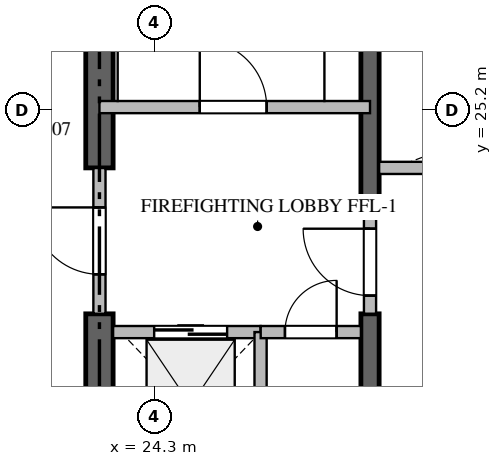
"""IFC4 building model, lengths in metres.
Left out: names, types, materials, properties, quantities, classifications, styles, units other than length and angle.
Written with IfcOpenShell. Run it as: python <this file> out.ifc"""

import sys

from ifc_helpers import new_model, si_unit, direction, frame, frame_2d, origin, place, context, subcontext, project, spatial, rectangle, extrude, source, transform, mapped, element, fill, save


model = new_model("IFC4")
c1 = context("Model", 3, precision=1e-05, world=origin(), true_north=direction((0.0, 1.0)))
c2 = subcontext(c1, "Body", "Model", "MODEL_VIEW")
j1 = project(units=[si_unit("LENGTHUNIT", "METRE"), si_unit("PLANEANGLEUNIT", "RADIAN")], contexts=[c1])
p1 = place(None, origin())
s1 = spatial("IfcSite", under=j1, at=p1, CompositionType="ELEMENT")
p2 = place(p1, origin())
s2 = spatial("IfcBuilding", under=s1, at=p2, CompositionType="ELEMENT")
p3 = place(p2, frame((0.0, 0.0, 26.7)))
s3 = spatial("IfcBuildingStorey", under=s2, at=p3, CompositionType="ELEMENT", Elevation=26.7)
p4 = place(p3, frame((23.4, 17.025, -0.44), z_axis=(0.0, 0.0, 1.0), x_axis=(0.0, 1.0, 0.0)))
e1 = element("IfcWall", 1, at=p4, inside=s3, PredefinedType="SHEAR", context=c2, shape_type="SweptSolid", body=[
    extrude(rectangle(XDim=4.825, YDim=0.45, at=frame_2d((2.413, 0.0))), origin(), (0.0, 0.0, 1.0), 3.928),
])
p5 = place(p3, frame((23.4, 24.25, -0.44), z_axis=(0.0, 0.0, 1.0), x_axis=(0.0, 1.0, 0.0)))
e2 = element("IfcWall", 2, at=p5, inside=s3, PredefinedType="SHEAR", context=c2, shape_type="SweptSolid", body=[
    extrude(rectangle(XDim=9.125, YDim=0.45, at=frame_2d((4.562, 0.0))), origin(), (0.0, 0.0, 1.0), 3.928),
])
p6 = place(p3, frame((27.85, 17.025, -0.44), z_axis=(0.0, 0.0, 1.0), x_axis=(0.0, 1.0, 0.0)))
e3 = element("IfcWall", 3, at=p6, inside=s3, PredefinedType="SHEAR", context=c2, shape_type="SweptSolid", body=[
    extrude(rectangle(XDim=4.825, YDim=0.3, at=frame_2d((2.413, 0.0))), origin(), (0.0, 0.0, 1.0), 3.928),
])
p7 = place(p3, frame((27.85, 23.55, -0.44), z_axis=(0.0, 0.0, 1.0), x_axis=(0.0, 1.0, 0.0)))
e4 = element("IfcWall", 4, at=p7, inside=s3, PredefinedType="SHEAR", context=c2, shape_type="SweptSolid", body=[
    extrude(rectangle(XDim=9.825, YDim=0.3, at=frame_2d((4.913, 0.0))), origin(), (0.0, 0.0, 1.0), 3.928),
])
p8 = place(p3, frame((23.4, 25.25, 0.0), z_axis=(0.0, 0.0, 1.0), x_axis=(1.0, 0.0, 0.0)))
e5 = element("IfcWall", 5, at=p8, inside=s3, PredefinedType="STANDARD", context=c2, shape_type="SweptSolid", body=[
    extrude(rectangle(XDim=4.45, YDim=0.2, at=frame_2d((2.225, 0.0))), origin(), (0.0, 0.0, 1.0), 3.49),
])
p9 = place(p8, frame((1.65, 0.0, 0.0)))
e6 = element("IfcOpeningElement", 6, at=p9, cuts=e5, PredefinedType="OPENING", context=c2, shape_type="SweptSolid", body=[
    extrude(rectangle(XDim=1.1, YDim=2.15, at=frame_2d((0.55, 1.075))), frame((0.0, 0.11, 0.0), z_axis=(0.0, -1.0, 0.0), x_axis=(1.0, 0.0, 0.0)), (0.0, 0.0, 1.0), 0.22),
])
p10 = place(p3, frame((23.625, 21.55, 0.0), z_axis=(0.0, 0.0, 1.0), x_axis=(1.0, 0.0, 0.0)))
e7 = element("IfcWall", 7, at=p10, inside=s3, PredefinedType="STANDARD", context=c2, shape_type="SweptSolid", body=[
    extrude(rectangle(XDim=2.425, YDim=0.2, at=frame_2d((1.212, 0.0))), origin(), (0.0, 0.0, 1.0), 3.49),
])
p11 = place(p10, frame((0.675, 0.0, 0.0)))
e8 = element("IfcOpeningElement", 8, at=p11, cuts=e7, PredefinedType="OPENING", context=c2, shape_type="SweptSolid", body=[
    extrude(rectangle(XDim=1.2, YDim=2.2, at=frame_2d((0.6, 1.1))), frame((0.0, 0.11, 0.0), z_axis=(0.0, -1.0, 0.0), x_axis=(1.0, 0.0, 0.0)), (0.0, 0.0, 1.0), 0.22),
])
p12 = place(p3, frame((28.0, 24.25, 0.0), z_axis=(0.0, 0.0, 1.0), x_axis=(1.0, 0.0, 0.0)))
e9 = element("IfcWall", 9, at=p12, inside=s3, PredefinedType="STANDARD", context=c2, shape_type="SweptSolid", body=[
    extrude(rectangle(XDim=2.425, YDim=0.2, at=frame_2d((1.212, 0.0))), origin(), (0.0, 0.0, 1.0), 3.49),
])
p13 = place(p3, frame((26.05, 19.05, 0.0), z_axis=(0.0, 0.0, 1.0), x_axis=(0.0, 1.0, 0.0)))
e10 = element("IfcWall", 10, at=p13, inside=s3, PredefinedType="STANDARD", context=c2, shape_type="SweptSolid", body=[
    extrude(rectangle(XDim=2.5, YDim=0.2, at=frame_2d((1.25, 0.0))), origin(), (0.0, 0.0, 1.0), 3.49),
])
p14 = place(p3, frame((26.052, 21.55, 0.0), z_axis=(0.0, 0.0, 1.0), x_axis=(1.0, 0.0, 0.0)))
e11 = element("IfcWall", 11, at=p14, inside=s3, PredefinedType="STANDARD", context=c2, shape_type="SweptSolid", body=[
    extrude(rectangle(XDim=1.648, YDim=0.2, at=frame_2d((0.824, 0.0))), origin(), (0.0, 0.0, 1.0), 3.49),
])
p15 = place(p14, frame((0.399, 0.0, 0.0)))
e12 = element("IfcOpeningElement", 12, at=p15, cuts=e11, PredefinedType="OPENING", context=c2, shape_type="SweptSolid", body=[
    extrude(rectangle(XDim=0.85, YDim=2.1, at=frame_2d((0.425, 1.05))), frame((0.0, 0.11, 0.0), z_axis=(0.0, -1.0, 0.0), x_axis=(1.0, 0.0, 0.0)), (0.0, 0.0, 1.0), 0.22),
])
p16 = place(p3, frame((23.4, 21.852, 0.0), z_axis=(0.0, 0.0, 1.0), x_axis=(0.0, 1.0, 0.0)))
e13 = element("IfcWall", 13, at=p16, inside=s3, PredefinedType="STANDARD", context=c2, shape_type="SweptSolid", body=[
    extrude(rectangle(XDim=2.396, YDim=0.2, at=frame_2d((1.198, 0.0))), origin(), (0.0, 0.0, 1.0), 3.49),
])
p17 = place(p16, frame((0.648, 0.0, 0.0)))
e14 = element("IfcOpeningElement", 14, at=p17, cuts=e13, PredefinedType="OPENING", context=c2, shape_type="SweptSolid", body=[
    extrude(rectangle(XDim=1.1, YDim=2.15, at=frame_2d((0.55, 1.075))), frame((0.0, 0.11, 0.0), z_axis=(0.0, -1.0, 0.0), x_axis=(1.0, 0.0, 0.0)), (0.0, 0.0, 1.0), 0.22),
])
p18 = place(p3, frame((27.85, 21.852, 0.0), z_axis=(0.0, 0.0, 1.0), x_axis=(0.0, 1.0, 0.0)))
e15 = element("IfcWall", 15, at=p18, inside=s3, PredefinedType="STANDARD", context=c2, shape_type="SweptSolid", body=[
    extrude(rectangle(XDim=1.696, YDim=0.2, at=frame_2d((0.848, 0.0))), origin(), (0.0, 0.0, 1.0), 3.49),
])
p19 = place(p18, frame((0.298, 0.0, 0.0)))
e16 = element("IfcOpeningElement", 16, at=p19, cuts=e15, PredefinedType="OPENING", context=c2, shape_type="SweptSolid", body=[
    extrude(rectangle(XDim=1.1, YDim=2.15, at=frame_2d((0.55, 1.075))), frame((0.0, 0.11, 0.0), z_axis=(0.0, -1.0, 0.0), x_axis=(1.0, 0.0, 0.0)), (0.0, 0.0, 1.0), 0.22),
])
m1 = source(origin(), c2, "Body", "SweptSolid", [
    extrude(rectangle(XDim=1.1, YDim=2.15, at=frame_2d((0.55, 1.075))), frame((0.0, 0.025, 0.0), z_axis=(0.0, -1.0, 0.0), x_axis=(1.0, 0.0, 0.0)), (0.0, 0.0, 1.0), 0.05),
])
p20 = place(p9, origin())
e17 = element("IfcDoor", 17, at=p20, inside=s3, OperationType="SINGLE_SWING_LEFT", PredefinedType="DOOR", context=c2, shape_type="MappedRepresentation", body=[
    mapped(m1, transform((0.0, 0.0, 0.0), scale=1.0)),
])
fill(e6, e17)
m2 = source(origin(), c2, "Body", "SweptSolid", [
    extrude(rectangle(XDim=1.2, YDim=2.2, at=frame_2d((0.6, 1.1))), frame((0.0, 0.025, 0.0), z_axis=(0.0, -1.0, 0.0), x_axis=(1.0, 0.0, 0.0)), (0.0, 0.0, 1.0), 0.05),
])
p21 = place(p11, origin())
e18 = element("IfcDoor", 18, at=p21, inside=s3, OperationType="DOUBLE_DOOR_SLIDING", PredefinedType="DOOR", context=c2, shape_type="MappedRepresentation", body=[
    mapped(m2, transform((0.0, 0.0, 0.0), scale=1.0)),
])
fill(e8, e18)
m3 = source(origin(), c2, "Body", "SweptSolid", [
    extrude(rectangle(XDim=0.85, YDim=2.1, at=frame_2d((0.425, 1.05))), frame((0.0, 0.025, 0.0), z_axis=(0.0, -1.0, 0.0), x_axis=(1.0, 0.0, 0.0)), (0.0, 0.0, 1.0), 0.05),
])
p22 = place(p15, origin())
e19 = element("IfcDoor", 19, at=p22, inside=s3, OperationType="SINGLE_SWING_RIGHT", PredefinedType="DOOR", context=c2, shape_type="MappedRepresentation", body=[
    mapped(m3, transform((0.0, 0.0, 0.0), scale=1.0)),
])
fill(e12, e19)
p23 = place(p17, origin())
e20 = element("IfcDoor", 20, at=p23, inside=s3, OperationType="SINGLE_SWING_RIGHT", PredefinedType="DOOR", context=c2, shape_type="MappedRepresentation", body=[
    mapped(m1, transform((0.0, 0.0, 0.0), scale=1.0)),
])
fill(e14, e20)
p24 = place(p19, origin())
e21 = element("IfcDoor", 21, at=p24, inside=s3, OperationType="SINGLE_SWING_RIGHT", PredefinedType="DOOR", context=c2, shape_type="MappedRepresentation", body=[
    mapped(m1, transform((0.0, 0.0, 0.0), scale=1.0)),
])
fill(e16, e21)
save(model, sys.argv[1])
